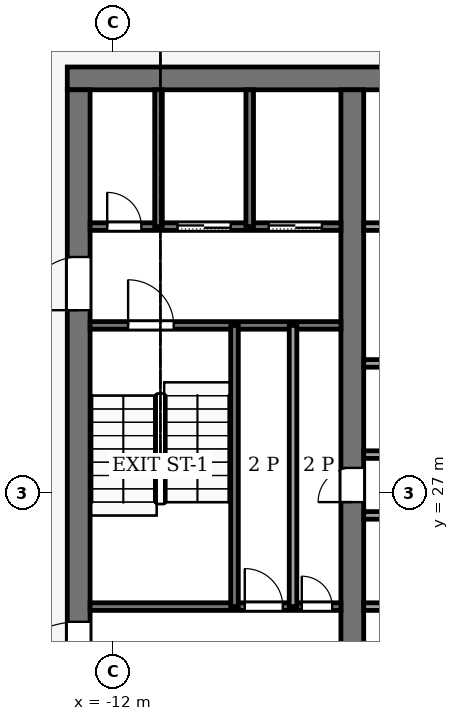
"""IFC4 building model, lengths in metres.
Left out: names, types, materials, properties, quantities, classifications, styles, units other than length and angle.
Written with IfcOpenShell. Run it as: python <this file> out.ifc"""

import sys

from ifc_helpers import new_model, si_unit, direction, frame, frame_2d, origin, place, context, subcontext, project, spatial, rectangle, extrude, element, fill, save


model = new_model("IFC4")
c1 = context("Model", 3, precision=1e-05, world=origin(), true_north=direction((0.0, 1.0)))
c2 = subcontext(c1, "Body", "Model", "MODEL_VIEW")
j1 = project(units=[si_unit("LENGTHUNIT", "METRE"), si_unit("PLANEANGLEUNIT", "RADIAN")], contexts=[c1])
p1 = place(None, origin())
s1 = spatial("IfcSite", under=j1, at=p1, CompositionType="ELEMENT")
p2 = place(p1, origin())
s2 = spatial("IfcBuilding", under=s1, at=p2, CompositionType="ELEMENT")
p3 = place(p2, frame((0.0, 0.0, 334.0)))
s3 = spatial("IfcBuildingStorey", under=s2, at=p3, CompositionType="ELEMENT", Elevation=334.0)
p4 = place(p3, frame((-13.2, 37.9, -0.18), z_axis=(0.0, 0.0, 1.0), x_axis=(1.0, 0.0, 0.0)))
e1 = element("IfcWall", 1, at=p4, inside=s3, PredefinedType="SHEAR", context=c2, shape_type="SweptSolid", body=[
    extrude(rectangle(XDim=26.4, YDim=0.6, at=frame_2d((13.2, 0.0))), origin(), (0.0, 0.0, 1.0), 6.53),
])
p5 = place(p3, frame((-12.9, 18.4, -0.18), z_axis=(0.0, 0.0, 1.0), x_axis=(0.0, 1.0, 0.0)))
e2 = element("IfcWall", 2, at=p5, inside=s3, PredefinedType="SHEAR", context=c2, shape_type="SweptSolid", body=[
    extrude(rectangle(XDim=19.2, YDim=0.6, at=frame_2d((9.6, 0.0))), origin(), (0.0, 0.0, 1.0), 6.53),
])
p6 = place(p5, frame((2.8, 0.0, 0.18)))
e3 = element("IfcOpeningElement", 3, at=p6, cuts=e2, PredefinedType="OPENING", context=c2, shape_type="SweptSolid", body=[
    extrude(rectangle(XDim=2.4, YDim=2.4, at=frame_2d((1.2, 1.2))), frame((0.0, 0.31, 0.0), z_axis=(0.0, -1.0, 0.0), x_axis=(1.0, 0.0, 0.0)), (0.0, 0.0, 1.0), 0.62),
])
p7 = place(p5, frame((13.4, 0.0, 0.18)))
e4 = element("IfcOpeningElement", 4, at=p7, cuts=e2, PredefinedType="OPENING", context=c2, shape_type="SweptSolid", body=[
    extrude(rectangle(XDim=1.4, YDim=2.2, at=frame_2d((0.7, 1.1))), frame((0.0, 0.31, 0.0), z_axis=(0.0, -1.0, 0.0), x_axis=(1.0, 0.0, 0.0)), (0.0, 0.0, 1.0), 0.62),
])
p8 = place(p3, frame((-5.7, 18.4, -0.18), z_axis=(0.0, 0.0, 1.0), x_axis=(0.0, 1.0, 0.0)))
e5 = element("IfcWall", 5, at=p8, inside=s3, PredefinedType="SHEAR", context=c2, shape_type="SweptSolid", body=[
    extrude(rectangle(XDim=19.2, YDim=0.6, at=frame_2d((9.6, 0.0))), origin(), (0.0, 0.0, 1.0), 6.53),
])
p9 = place(p8, frame((8.35, 0.0, 0.18)))
e6 = element("IfcOpeningElement", 6, at=p9, cuts=e5, PredefinedType="OPENING", context=c2, shape_type="SweptSolid", body=[
    extrude(rectangle(XDim=0.9, YDim=2.1, at=frame_2d((0.45, 1.05))), frame((0.0, 0.31, 0.0), z_axis=(0.0, -1.0, 0.0), x_axis=(1.0, 0.0, 0.0)), (0.0, 0.0, 1.0), 0.62),
])
p10 = place(p3, frame((-12.6, 24.0, 0.0), z_axis=(0.0, 0.0, 1.0), x_axis=(1.0, 0.0, 0.0)))
e7 = element("IfcWall", 7, at=p10, inside=s3, PredefinedType="PARTITIONING", context=c2, shape_type="SweptSolid", body=[
    extrude(rectangle(XDim=6.6, YDim=0.2, at=frame_2d((3.3, 0.0))), origin(), (0.0, 0.0, 1.0), 6.35),
])
p11 = place(p10, frame((4.07, 0.0, 0.0)))
e8 = element("IfcOpeningElement", 8, at=p11, cuts=e7, PredefinedType="OPENING", context=c2, shape_type="SweptSolid", body=[
    extrude(rectangle(XDim=1.0, YDim=2.1, at=frame_2d((0.5, 1.05))), frame((0.0, 0.11, 0.0), z_axis=(0.0, -1.0, 0.0), x_axis=(1.0, 0.0, 0.0)), (0.0, 0.0, 1.0), 0.22),
])
p12 = place(p10, frame((5.57, 0.0, 0.0)))
e9 = element("IfcOpeningElement", 9, at=p12, cuts=e7, PredefinedType="OPENING", context=c2, shape_type="SweptSolid", body=[
    extrude(rectangle(XDim=0.8, YDim=2.1, at=frame_2d((0.4, 1.05))), frame((0.0, 0.11, 0.0), z_axis=(0.0, -1.0, 0.0), x_axis=(1.0, 0.0, 0.0)), (0.0, 0.0, 1.0), 0.22),
])
p13 = place(p3, frame((-5.4, 24.0, 0.0), z_axis=(0.0, 0.0, 1.0), x_axis=(1.0, 0.0, 0.0)))
e10 = element("IfcWall", 10, at=p13, inside=s3, PredefinedType="PARTITIONING", context=c2, shape_type="SweptSolid", body=[
    extrude(rectangle(XDim=10.8, YDim=0.2, at=frame_2d((5.4, 0.0))), origin(), (0.0, 0.0, 1.0), 6.35),
])
p14 = place(p13, frame((3.064, 0.0, 0.0)))
e11 = element("IfcOpeningElement", 11, at=p14, cuts=e10, PredefinedType="OPENING", context=c2, shape_type="SweptSolid", body=[
    extrude(rectangle(XDim=1.0, YDim=2.1, at=frame_2d((0.5, 1.05))), frame((0.0, 0.11, 0.0), z_axis=(0.0, -1.0, 0.0), x_axis=(1.0, 0.0, 0.0)), (0.0, 0.0, 1.0), 0.22),
])
p15 = place(p13, frame((8.464, 0.0, 0.0)))
e12 = element("IfcOpeningElement", 12, at=p15, cuts=e10, PredefinedType="OPENING", context=c2, shape_type="SweptSolid", body=[
    extrude(rectangle(XDim=1.0, YDim=2.1, at=frame_2d((0.5, 1.05))), frame((0.0, 0.11, 0.0), z_axis=(0.0, -1.0, 0.0), x_axis=(1.0, 0.0, 0.0)), (0.0, 0.0, 1.0), 0.22),
])
for number, where, z_axis, x_axis in (
    (13, (-5.4, 26.4, 0.0), (0.0, 0.0, 1.0), (1.0, 0.0, 0.0)),
    (14, (-5.4, 28.0, 0.0), (0.0, 0.0, 1.0), (1.0, 0.0, 0.0)),
):
    element("IfcWall", number, at=place(p3, frame(where, z_axis=z_axis, x_axis=x_axis)), inside=s3, PredefinedType="PARTITIONING", context=c2, shape_type="SweptSolid", body=[
        extrude(rectangle(XDim=10.8, YDim=0.2, at=frame_2d((5.4, 0.0))), origin(), (0.0, 0.0, 1.0), 6.35),
    ])
p16 = place(p3, frame((-5.4, 30.4, 0.0), z_axis=(0.0, 0.0, 1.0), x_axis=(1.0, 0.0, 0.0)))
e15 = element("IfcWall", 15, at=p16, inside=s3, PredefinedType="PARTITIONING", context=c2, shape_type="SweptSolid", body=[
    extrude(rectangle(XDim=10.8, YDim=0.2, at=frame_2d((5.4, 0.0))), origin(), (0.0, 0.0, 1.0), 6.35),
])
p17 = place(p16, frame((3.064, 0.0, 0.0)))
e16 = element("IfcOpeningElement", 16, at=p17, cuts=e15, PredefinedType="OPENING", context=c2, shape_type="SweptSolid", body=[
    extrude(rectangle(XDim=1.0, YDim=2.1, at=frame_2d((0.5, 1.05))), frame((0.0, 0.11, 0.0), z_axis=(0.0, -1.0, 0.0), x_axis=(1.0, 0.0, 0.0)), (0.0, 0.0, 1.0), 0.22),
])
p18 = place(p16, frame((8.464, 0.0, 0.0)))
e17 = element("IfcOpeningElement", 17, at=p18, cuts=e15, PredefinedType="OPENING", context=c2, shape_type="SweptSolid", body=[
    extrude(rectangle(XDim=1.0, YDim=2.1, at=frame_2d((0.5, 1.05))), frame((0.0, 0.11, 0.0), z_axis=(0.0, -1.0, 0.0), x_axis=(1.0, 0.0, 0.0)), (0.0, 0.0, 1.0), 0.22),
])
p19 = place(p3, frame((-12.6, 31.4, 0.0), z_axis=(0.0, 0.0, 1.0), x_axis=(1.0, 0.0, 0.0)))
e18 = element("IfcWall", 18, at=p19, inside=s3, PredefinedType="PARTITIONING", context=c2, shape_type="SweptSolid", body=[
    extrude(rectangle(XDim=6.6, YDim=0.2, at=frame_2d((3.3, 0.0))), origin(), (0.0, 0.0, 1.0), 6.35),
])
p20 = place(p19, frame((1.0, 0.0, 0.0)))
e19 = element("IfcOpeningElement", 19, at=p20, cuts=e18, PredefinedType="OPENING", context=c2, shape_type="SweptSolid", body=[
    extrude(rectangle(XDim=1.2, YDim=2.2, at=frame_2d((0.6, 1.1))), frame((0.0, 0.11, 0.0), z_axis=(0.0, -1.0, 0.0), x_axis=(1.0, 0.0, 0.0)), (0.0, 0.0, 1.0), 0.22),
])
p21 = place(p3, frame((-12.6, 34.0, 0.0), z_axis=(0.0, 0.0, 1.0), x_axis=(1.0, 0.0, 0.0)))
e20 = element("IfcWall", 20, at=p21, inside=s3, PredefinedType="PARTITIONING", context=c2, shape_type="SweptSolid", body=[
    extrude(rectangle(XDim=6.6, YDim=0.2, at=frame_2d((3.3, 0.0))), origin(), (0.0, 0.0, 1.0), 6.35),
])
p22 = place(p21, frame((4.7, 0.0, 0.0)))
e21 = element("IfcOpeningElement", 21, at=p22, cuts=e20, PredefinedType="OPENING", context=c2, shape_type="SweptSolid", body=[
    extrude(rectangle(XDim=1.4, YDim=2.2, at=frame_2d((0.7, 1.1))), frame((0.0, 0.11, 0.0), z_axis=(0.0, -1.0, 0.0), x_axis=(1.0, 0.0, 0.0)), (0.0, 0.0, 1.0), 0.22),
])
p23 = place(p21, frame((2.3, 0.0, 0.0)))
e22 = element("IfcOpeningElement", 22, at=p23, cuts=e20, PredefinedType="OPENING", context=c2, shape_type="SweptSolid", body=[
    extrude(rectangle(XDim=1.4, YDim=2.2, at=frame_2d((0.7, 1.1))), frame((0.0, 0.11, 0.0), z_axis=(0.0, -1.0, 0.0), x_axis=(1.0, 0.0, 0.0)), (0.0, 0.0, 1.0), 0.22),
])
p24 = place(p21, frame((0.45, 0.0, 0.0)))
e23 = element("IfcOpeningElement", 23, at=p24, cuts=e20, PredefinedType="OPENING", context=c2, shape_type="SweptSolid", body=[
    extrude(rectangle(XDim=0.9, YDim=2.1, at=frame_2d((0.45, 1.05))), frame((0.0, 0.11, 0.0), z_axis=(0.0, -1.0, 0.0), x_axis=(1.0, 0.0, 0.0)), (0.0, 0.0, 1.0), 0.22),
])
p25 = place(p3, frame((-5.4, 34.0, 0.0), z_axis=(0.0, 0.0, 1.0), x_axis=(1.0, 0.0, 0.0)))
e24 = element("IfcWall", 24, at=p25, inside=s3, PredefinedType="PARTITIONING", context=c2, shape_type="SweptSolid", body=[
    extrude(rectangle(XDim=10.8, YDim=0.2, at=frame_2d((5.4, 0.0))), origin(), (0.0, 0.0, 1.0), 6.35),
])
p26 = place(p25, frame((0.75, 0.0, 0.0)))
e25 = element("IfcOpeningElement", 25, at=p26, cuts=e24, PredefinedType="OPENING", context=c2, shape_type="SweptSolid", body=[
    extrude(rectangle(XDim=1.2, YDim=2.2, at=frame_2d((0.6, 1.1))), frame((0.0, 0.11, 0.0), z_axis=(0.0, -1.0, 0.0), x_axis=(1.0, 0.0, 0.0)), (0.0, 0.0, 1.0), 0.22),
])
p27 = place(p25, frame((3.45, 0.0, 0.0)))
e26 = element("IfcOpeningElement", 26, at=p27, cuts=e24, PredefinedType="OPENING", context=c2, shape_type="SweptSolid", body=[
    extrude(rectangle(XDim=1.2, YDim=2.2, at=frame_2d((0.6, 1.1))), frame((0.0, 0.11, 0.0), z_axis=(0.0, -1.0, 0.0), x_axis=(1.0, 0.0, 0.0)), (0.0, 0.0, 1.0), 0.22),
])
p28 = place(p25, frame((6.15, 0.0, 0.0)))
e27 = element("IfcOpeningElement", 27, at=p28, cuts=e24, PredefinedType="OPENING", context=c2, shape_type="SweptSolid", body=[
    extrude(rectangle(XDim=1.2, YDim=2.2, at=frame_2d((0.6, 1.1))), frame((0.0, 0.11, 0.0), z_axis=(0.0, -1.0, 0.0), x_axis=(1.0, 0.0, 0.0)), (0.0, 0.0, 1.0), 0.22),
])
p29 = place(p25, frame((8.95, 0.0, 0.0)))
e28 = element("IfcOpeningElement", 28, at=p29, cuts=e24, PredefinedType="OPENING", context=c2, shape_type="SweptSolid", body=[
    extrude(rectangle(XDim=1.0, YDim=2.1, at=frame_2d((0.5, 1.05))), frame((0.0, 0.11, 0.0), z_axis=(0.0, -1.0, 0.0), x_axis=(1.0, 0.0, 0.0)), (0.0, 0.0, 1.0), 0.22),
])
p30 = place(p3, frame((-10.8, 34.0, 0.0), z_axis=(0.0, 0.0, 1.0), x_axis=(0.0, 1.0, 0.0)))
e29 = element("IfcWall", 29, at=p30, inside=s3, PredefinedType="PARTITIONING", context=c2, shape_type="SweptSolid", body=[
    extrude(rectangle(XDim=3.6, YDim=0.2, at=frame_2d((1.8, 0.0))), origin(), (0.0, 0.0, 1.0), 6.35),
])
p31 = place(p3, frame((-8.8, 24.0, 0.0), z_axis=(0.0, 0.0, 1.0), x_axis=(0.0, 1.0, 0.0)))
e30 = element("IfcWall", 30, at=p31, inside=s3, PredefinedType="PARTITIONING", context=c2, shape_type="SweptSolid", body=[
    extrude(rectangle(XDim=7.4, YDim=0.2, at=frame_2d((3.7, 0.0))), origin(), (0.0, 0.0, 1.0), 6.35),
])
p32 = place(p3, frame((-8.4, 34.0, 0.0), z_axis=(0.0, 0.0, 1.0), x_axis=(0.0, 1.0, 0.0)))
e31 = element("IfcWall", 31, at=p32, inside=s3, PredefinedType="PARTITIONING", context=c2, shape_type="SweptSolid", body=[
    extrude(rectangle(XDim=3.6, YDim=0.2, at=frame_2d((1.8, 0.0))), origin(), (0.0, 0.0, 1.0), 6.35),
])
p33 = place(p3, frame((-7.26, 24.0, 0.0), z_axis=(0.0, 0.0, 1.0), x_axis=(0.0, 1.0, 0.0)))
e32 = element("IfcWall", 32, at=p33, inside=s3, PredefinedType="PARTITIONING", context=c2, shape_type="SweptSolid", body=[
    extrude(rectangle(XDim=7.4, YDim=0.2, at=frame_2d((3.7, 0.0))), origin(), (0.0, 0.0, 1.0), 6.35),
])
p34 = place(p22, origin())
e33 = element("IfcDoor", 33, at=p34, inside=s3, OperationType="SLIDING_TO_LEFT", PredefinedType="DOOR", context=c2, shape_type="SweptSolid", body=[
    extrude(rectangle(XDim=1.4, YDim=2.2, at=frame_2d((0.7, 1.1))), frame((0.0, 0.025, 0.0), z_axis=(0.0, -1.0, 0.0), x_axis=(1.0, 0.0, 0.0)), (0.0, 0.0, 1.0), 0.05),
])
fill(e21, e33)
p35 = place(p23, origin())
e34 = element("IfcDoor", 34, at=p35, inside=s3, OperationType="SLIDING_TO_LEFT", PredefinedType="DOOR", context=c2, shape_type="SweptSolid", body=[
    extrude(rectangle(XDim=1.4, YDim=2.2, at=frame_2d((0.7, 1.1))), frame((0.0, 0.025, 0.0), z_axis=(0.0, -1.0, 0.0), x_axis=(1.0, 0.0, 0.0)), (0.0, 0.0, 1.0), 0.05),
])
fill(e22, e34)
p36 = place(p24, origin())
e35 = element("IfcDoor", 35, at=p36, inside=s3, OperationType="SINGLE_SWING_RIGHT", PredefinedType="DOOR", context=c2, shape_type="SweptSolid", body=[
    extrude(rectangle(XDim=0.9, YDim=2.1, at=frame_2d((0.45, 1.05))), frame((0.0, 0.025, 0.0), z_axis=(0.0, -1.0, 0.0), x_axis=(1.0, 0.0, 0.0)), (0.0, 0.0, 1.0), 0.05),
])
fill(e23, e35)
p37 = place(p11, origin())
e36 = element("IfcDoor", 36, at=p37, inside=s3, OperationType="SINGLE_SWING_RIGHT", PredefinedType="DOOR", context=c2, shape_type="SweptSolid", body=[
    extrude(rectangle(XDim=1.0, YDim=2.1, at=frame_2d((0.5, 1.05))), frame((0.0, 0.025, 0.0), z_axis=(0.0, -1.0, 0.0), x_axis=(1.0, 0.0, 0.0)), (0.0, 0.0, 1.0), 0.05),
])
fill(e8, e36)
p38 = place(p12, origin())
e37 = element("IfcDoor", 37, at=p38, inside=s3, OperationType="SINGLE_SWING_LEFT", PredefinedType="DOOR", context=c2, shape_type="SweptSolid", body=[
    extrude(rectangle(XDim=0.8, YDim=2.1, at=frame_2d((0.4, 1.05))), frame((0.0, 0.025, 0.0), z_axis=(0.0, -1.0, 0.0), x_axis=(1.0, 0.0, 0.0)), (0.0, 0.0, 1.0), 0.05),
])
fill(e9, e37)
p39 = place(p9, origin())
e38 = element("IfcDoor", 38, at=p39, inside=s3, OperationType="SINGLE_SWING_LEFT", PredefinedType="DOOR", context=c2, shape_type="SweptSolid", body=[
    extrude(rectangle(XDim=0.9, YDim=2.1, at=frame_2d((0.45, 1.05))), frame((0.0, 0.025, 0.0), z_axis=(0.0, -1.0, 0.0), x_axis=(1.0, 0.0, 0.0)), (0.0, 0.0, 1.0), 0.05),
])
fill(e6, e38)
p40 = place(p20, origin())
e39 = element("IfcDoor", 39, at=p40, inside=s3, OperationType="SINGLE_SWING_RIGHT", PredefinedType="DOOR", context=c2, shape_type="SweptSolid", body=[
    extrude(rectangle(XDim=1.2, YDim=2.2, at=frame_2d((0.6, 1.1))), frame((0.0, 0.025, 0.0), z_axis=(0.0, -1.0, 0.0), x_axis=(1.0, 0.0, 0.0)), (0.0, 0.0, 1.0), 0.05),
])
fill(e19, e39)
p41 = place(p6, origin())
e40 = element("IfcDoor", 40, at=p41, inside=s3, OperationType="DOUBLE_DOOR_SINGLE_SWING", PredefinedType="DOOR", context=c2, shape_type="SweptSolid", body=[
    extrude(rectangle(XDim=2.4, YDim=2.4, at=frame_2d((1.2, 1.2))), frame((0.0, 0.025, 0.0), z_axis=(0.0, -1.0, 0.0), x_axis=(1.0, 0.0, 0.0)), (0.0, 0.0, 1.0), 0.05),
])
fill(e3, e40)
p42 = place(p7, origin())
e41 = element("IfcDoor", 41, at=p42, inside=s3, OperationType="SINGLE_SWING_RIGHT", PredefinedType="DOOR", context=c2, shape_type="SweptSolid", body=[
    extrude(rectangle(XDim=1.4, YDim=2.2, at=frame_2d((0.7, 1.1))), frame((0.0, 0.025, 0.0), z_axis=(0.0, -1.0, 0.0), x_axis=(1.0, 0.0, 0.0)), (0.0, 0.0, 1.0), 0.05),
])
fill(e4, e41)
save(model, sys.argv[1])
